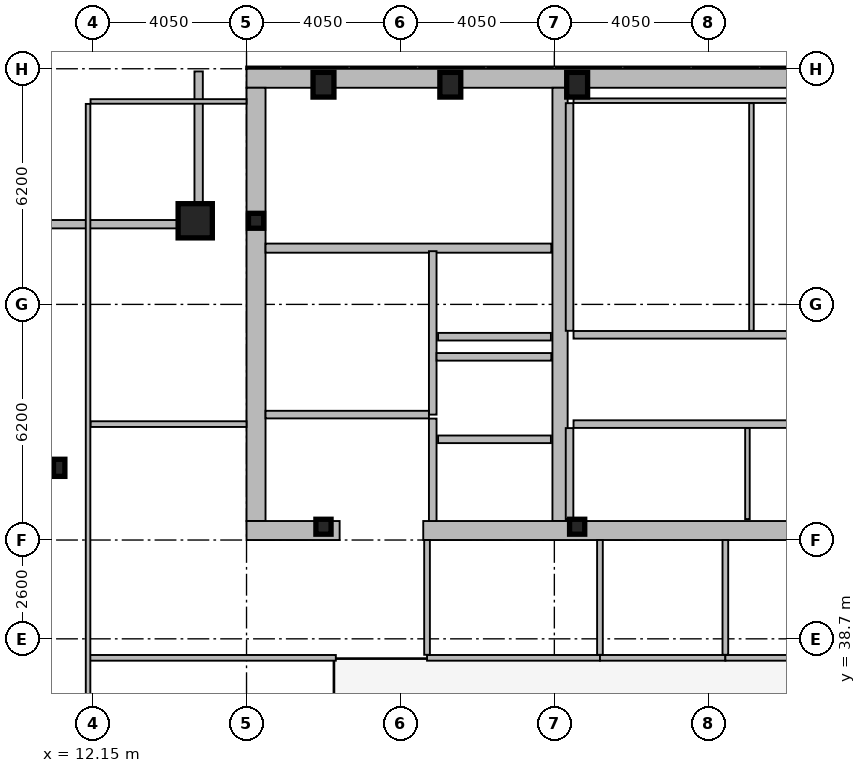
"""IFC4 building model, lengths in metres.
Left out: names, types, materials, properties, quantities, classifications, styles, units other than length and angle.
Written with IfcOpenShell. Run it as: python <this file> out.ifc"""

import sys

from ifc_helpers import new_model, si_unit, direction, frame, frame_2d, origin, origin_2d, place, context, subcontext, project, spatial, rectangle, hollow_rectangle, i_section, extrude, element, fill, save


model = new_model("IFC4")
c1 = context("Model", 3, precision=1e-05, world=origin(), true_north=direction((0.0, 1.0)))
c2 = subcontext(c1, "Body", "Model", "MODEL_VIEW")
j1 = project(units=[si_unit("LENGTHUNIT", "METRE"), si_unit("PLANEANGLEUNIT", "RADIAN")], contexts=[c1])
p1 = place(None, origin())
s1 = spatial("IfcSite", under=j1, at=p1, CompositionType="ELEMENT")
p2 = place(p1, origin())
s2 = spatial("IfcBuilding", under=s1, at=p2, CompositionType="ELEMENT")
p3 = place(p2, frame((0.0, 0.0, 329.0)))
s3 = spatial("IfcBuildingStorey", under=s2, at=p3, CompositionType="ELEMENT", Elevation=329.0)
p4 = place(p3, frame((16.2, 53.45, 0.0), z_axis=(0.0, 0.0, 1.0), x_axis=(1.0, 0.0, 0.0)))
e1 = element("IfcWall", 1, at=p4, inside=s3, PredefinedType="SHEAR", context=c2, shape_type="SweptSolid", body=[
    extrude(rectangle(XDim=40.5, YDim=0.5, at=frame_2d((20.25, 0.0))), origin(), (0.0, 0.0, 1.0), 3.44),
])
p5 = place(p3, frame((16.45, 41.8, 0.0), z_axis=(0.0, 0.0, 1.0), x_axis=(0.0, 1.0, 0.0)))
e2 = element("IfcWall", 2, at=p5, inside=s3, PredefinedType="SHEAR", context=c2, shape_type="SweptSolid", body=[
    extrude(rectangle(XDim=11.4, YDim=0.5, at=frame_2d((5.7, 0.0))), origin(), (0.0, 0.0, 1.0), 3.44),
])
p6 = place(p3, frame((24.45, 41.8, 0.0), z_axis=(0.0, 0.0, 1.0), x_axis=(0.0, 1.0, 0.0)))
e3 = element("IfcWall", 3, at=p6, inside=s3, PredefinedType="SHEAR", context=c2, shape_type="SweptSolid", body=[
    extrude(rectangle(XDim=11.4, YDim=0.4, at=frame_2d((5.7, 0.0))), origin(), (0.0, 0.0, 1.0), 3.44),
])
p7 = place(p3, frame((18.65, 41.55, 0.0), z_axis=(0.0, 0.0, 1.0), x_axis=(-1.0, 0.0, 0.0)))
e4 = element("IfcWall", 4, at=p7, inside=s3, PredefinedType="SHEAR", context=c2, shape_type="SweptSolid", body=[
    extrude(rectangle(XDim=2.45, YDim=0.5, at=frame_2d((1.225, 0.0))), origin(), (0.0, 0.0, 1.0), 3.44),
])
p8 = place(p3, frame((32.3, 41.55, 0.0), z_axis=(0.0, 0.0, 1.0), x_axis=(-1.0, 0.0, 0.0)))
e5 = element("IfcWall", 5, at=p8, inside=s3, PredefinedType="SHEAR", context=c2, shape_type="SweptSolid", body=[
    extrude(rectangle(XDim=11.45, YDim=0.5, at=frame_2d((5.725, 0.0))), origin(), (0.0, 0.0, 1.0), 3.44),
])
p9 = place(p3, frame((16.7, 48.98, 0.0), z_axis=(0.0, 0.0, 1.0), x_axis=(1.0, 0.0, 0.0)))
e6 = element("IfcWall", 6, at=p9, inside=s3, PredefinedType="SHEAR", context=c2, shape_type="SweptSolid", body=[
    extrude(rectangle(XDim=7.52, YDim=0.24, at=frame_2d((3.76, 0.0))), origin(), (0.0, 0.0, 1.0), 3.44),
])
p10 = place(p9, frame((0.22, 0.0, 0.0)))
e7 = element("IfcOpeningElement", 7, at=p10, cuts=e6, PredefinedType="OPENING", context=c2, shape_type="SweptSolid", body=[
    extrude(rectangle(XDim=1.05, YDim=2.15, at=frame_2d((0.525, 1.075))), frame((0.0, 0.13, 0.0), z_axis=(0.0, -1.0, 0.0), x_axis=(1.0, 0.0, 0.0)), (0.0, 0.0, 1.0), 0.26),
])
p11 = place(p3, frame((14.85, 49.7, 0.0), z_axis=(0.0, 0.0, 1.0), x_axis=(1.0, 0.0, 0.0)))
e8 = element("IfcColumn", 8, at=p11, inside=s3, PredefinedType="COLUMN", context=c2, shape_type="SweptSolid", body=[
    extrude(hollow_rectangle(XDim=0.9, YDim=0.9, WallThickness=0.05, at=origin_2d()), origin(), (0.0, 0.0, 1.0), 3.6),
])
for number, where, z_axis, x_axis in (
    (9, (18.225, 53.28, 0.0), (0.0, 0.0, 1.0), (1.0, 0.0, 0.0)),
    (10, (21.562, 53.28, 0.0), (0.0, 0.0, 1.0), (1.0, 0.0, 0.0)),
    (11, (24.9, 53.28, 0.0), (0.0, 0.0, 1.0), (1.0, 0.0, 0.0)),
):
    element("IfcColumn", number, at=place(p3, frame(where, z_axis=z_axis, x_axis=x_axis)), inside=s3, PredefinedType="COLUMN", context=c2, shape_type="SweptSolid", body=[
        extrude(hollow_rectangle(XDim=0.55, YDim=0.65, WallThickness=0.04, at=origin_2d()), origin(), (0.0, 0.0, 1.0), 3.6),
    ])
p12 = place(p3, frame((11.27, 43.2, 0.0), z_axis=(0.0, 0.0, 1.0), x_axis=(1.0, 0.0, 0.0)))
e12 = element("IfcColumn", 12, at=p12, inside=s3, PredefinedType="COLUMN", context=c2, shape_type="SweptSolid", body=[
    extrude(i_section(OverallWidth=0.3, OverallDepth=0.45, WebThickness=0.014, FlangeThickness=0.026, at=origin_2d()), origin(), (0.0, 0.0, 1.0), 3.6),
])
for number, where, z_axis, x_axis in (
    (13, (16.45, 49.7, 0.0), (0.0, 0.0, 1.0), (1.0, 0.0, 0.0)),
    (14, (18.225, 41.65, 0.0), (0.0, 0.0, 1.0), (1.0, 0.0, 0.0)),
    (15, (24.9, 41.65, 0.0), (0.0, 0.0, 1.0), (1.0, 0.0, 0.0)),
):
    element("IfcColumn", number, at=place(p3, frame(where, z_axis=z_axis, x_axis=x_axis)), inside=s3, PredefinedType="COLUMN", context=c2, shape_type="SweptSolid", body=[
        extrude(i_section(OverallWidth=0.399, OverallDepth=0.393, WebThickness=0.023, FlangeThickness=0.037, at=origin_2d()), origin(), (0.0, 0.0, 1.0), 3.6),
    ])
p13 = place(p3, frame((10.83, 49.61, 0.0), z_axis=(0.0, 0.0, 1.0), x_axis=(1.0, 0.0, 0.0)))
e16 = element("IfcWall", 16, at=p13, inside=s3, PredefinedType="SOLIDWALL", context=c2, shape_type="SweptSolid", body=[
    extrude(rectangle(XDim=4.22, YDim=0.22, at=frame_2d((2.11, 0.0))), origin(), (0.0, 0.0, 1.0), 2.88),
])
p14 = place(p3, frame((14.94, 49.72, 0.0), z_axis=(0.0, 0.0, 1.0), x_axis=(0.0, 1.0, 0.0)))
e17 = element("IfcWall", 17, at=p14, inside=s3, PredefinedType="SOLIDWALL", context=c2, shape_type="SweptSolid", body=[
    extrude(rectangle(XDim=3.91, YDim=0.22, at=frame_2d((1.955, 0.0))), origin(), (0.0, 0.0, 1.0), 2.88),
])
p15 = place(p3, frame((24.21, 43.95, 0.0), z_axis=(0.0, 0.0, 1.0), x_axis=(-1.0, 0.0, 0.0)))
e18 = element("IfcWall", 18, at=p15, inside=s3, PredefinedType="PARTITIONING", context=c2, shape_type="SweptSolid", body=[
    extrude(rectangle(XDim=2.97, YDim=0.2, at=frame_2d((1.485, 0.0))), origin(), (0.0, 0.0, 1.0), 3.44),
])
p16 = place(p15, frame((0.86, 0.0, 0.0)))
e19 = element("IfcOpeningElement", 19, at=p16, cuts=e18, PredefinedType="OPENING", context=c2, shape_type="SweptSolid", body=[
    extrude(rectangle(XDim=1.3, YDim=2.18, at=frame_2d((0.65, 1.09))), frame((0.0, 0.11, 0.0), z_axis=(0.0, -1.0, 0.0), x_axis=(1.0, 0.0, 0.0)), (0.0, 0.0, 1.0), 0.22),
])
p17 = place(p3, frame((24.21, 46.65, 0.0), z_axis=(0.0, 0.0, 1.0), x_axis=(-1.0, 0.0, 0.0)))
e20 = element("IfcWall", 20, at=p17, inside=s3, PredefinedType="PARTITIONING", context=c2, shape_type="SweptSolid", body=[
    extrude(rectangle(XDim=2.97, YDim=0.2, at=frame_2d((1.485, 0.0))), origin(), (0.0, 0.0, 1.0), 3.44),
])
p18 = place(p17, frame((0.91, 0.0, 0.0)))
e21 = element("IfcOpeningElement", 21, at=p18, cuts=e20, PredefinedType="OPENING", context=c2, shape_type="SweptSolid", body=[
    extrude(rectangle(XDim=1.2, YDim=2.18, at=frame_2d((0.6, 1.09))), frame((0.0, 0.11, 0.0), z_axis=(0.0, -1.0, 0.0), x_axis=(1.0, 0.0, 0.0)), (0.0, 0.0, 1.0), 0.22),
])
p19 = place(p3, frame((21.1, 44.6, 0.0), z_axis=(0.0, 0.0, 1.0), x_axis=(0.0, 1.0, 0.0)))
e22 = element("IfcWall", 22, at=p19, inside=s3, PredefinedType="PARTITIONING", context=c2, shape_type="SweptSolid", body=[
    extrude(rectangle(XDim=4.3, YDim=0.2, at=frame_2d((2.15, 0.0))), origin(), (0.0, 0.0, 1.0), 3.44),
])
p20 = place(p3, frame((16.7, 44.6, 0.0), z_axis=(0.0, 0.0, 1.0), x_axis=(1.0, 0.0, 0.0)))
e23 = element("IfcWall", 23, at=p20, inside=s3, PredefinedType="PARTITIONING", context=c2, shape_type="SweptSolid", body=[
    extrude(rectangle(XDim=4.3, YDim=0.2, at=frame_2d((2.15, 0.0))), origin(), (0.0, 0.0, 1.0), 3.44),
])
p21 = place(p20, frame((1.25, 0.0, 0.0)))
e24 = element("IfcOpeningElement", 24, at=p21, cuts=e23, PredefinedType="OPENING", context=c2, shape_type="SweptSolid", body=[
    extrude(rectangle(XDim=1.05, YDim=2.15, at=frame_2d((0.525, 1.075))), frame((0.0, 0.11, 0.0), z_axis=(0.0, -1.0, 0.0), x_axis=(1.0, 0.0, 0.0)), (0.0, 0.0, 1.0), 0.22),
])
p22 = place(p3, frame((21.2, 46.12, 0.0), z_axis=(0.0, 0.0, 1.0), x_axis=(1.0, 0.0, 0.0)))
e25 = element("IfcWall", 25, at=p22, inside=s3, PredefinedType="PARTITIONING", context=c2, shape_type="SweptSolid", body=[
    extrude(rectangle(XDim=3.02, YDim=0.2, at=frame_2d((1.51, 0.0))), origin(), (0.0, 0.0, 1.0), 3.44),
])
p23 = place(p3, frame((21.1, 41.8, 0.0), z_axis=(0.0, 0.0, 1.0), x_axis=(0.0, 1.0, 0.0)))
e26 = element("IfcWall", 26, at=p23, inside=s3, PredefinedType="PARTITIONING", context=c2, shape_type="SweptSolid", body=[
    extrude(rectangle(XDim=2.695, YDim=0.2, at=frame_2d((1.348, 0.0))), origin(), (0.0, 0.0, 1.0), 3.44),
])
p24 = place(p23, frame((0.38, 0.0, 0.0)))
e27 = element("IfcOpeningElement", 27, at=p24, cuts=e26, PredefinedType="OPENING", context=c2, shape_type="SweptSolid", body=[
    extrude(rectangle(XDim=1.05, YDim=2.15, at=frame_2d((0.525, 1.075))), frame((0.0, 0.11, 0.0), z_axis=(0.0, -1.0, 0.0), x_axis=(1.0, 0.0, 0.0)), (0.0, 0.0, 1.0), 0.22),
])
p25 = place(p3, frame((24.7, 46.805, 0.0), z_axis=(0.0, 0.0, 1.0), x_axis=(0.0, 1.0, 0.0)))
e28 = element("IfcWall", 28, at=p25, inside=s3, PredefinedType="PARTITIONING", context=c2, shape_type="SweptSolid", body=[
    extrude(rectangle(XDim=5.99, YDim=0.2, at=frame_2d((2.995, 0.0))), origin(), (0.0, 0.0, 1.0), 3.44),
])
p26 = place(p3, frame((24.805, 52.86, 0.0), z_axis=(0.0, 0.0, 1.0), x_axis=(1.0, 0.0, 0.0)))
e29 = element("IfcWall", 29, at=p26, inside=s3, PredefinedType="PARTITIONING", context=c2, shape_type="SweptSolid", body=[
    extrude(rectangle(XDim=7.51, YDim=0.12, at=frame_2d((3.755, 0.0))), origin(), (0.0, 0.0, 1.0), 3.44),
])
p27 = place(p3, frame((29.486, 46.805, 0.0), z_axis=(0.0, 0.0, 1.0), x_axis=(0.0, 1.0, 0.0)))
e30 = element("IfcWall", 30, at=p27, inside=s3, PredefinedType="PARTITIONING", context=c2, shape_type="SweptSolid", body=[
    extrude(rectangle(XDim=5.99, YDim=0.12, at=frame_2d((2.995, 0.0))), origin(), (0.0, 0.0, 1.0), 3.44),
])
p28 = place(p3, frame((24.805, 46.7, 0.0), z_axis=(0.0, 0.0, 1.0), x_axis=(1.0, 0.0, 0.0)))
e31 = element("IfcWall", 31, at=p28, inside=s3, PredefinedType="PARTITIONING", context=c2, shape_type="SweptSolid", body=[
    extrude(rectangle(XDim=7.51, YDim=0.2, at=frame_2d((3.755, 0.0))), origin(), (0.0, 0.0, 1.0), 3.44),
])
p29 = place(p28, frame((1.15, 0.0, 0.0)))
e32 = element("IfcOpeningElement", 32, at=p29, cuts=e31, PredefinedType="OPENING", context=c2, shape_type="SweptSolid", body=[
    extrude(rectangle(XDim=0.95, YDim=2.1, at=frame_2d((0.475, 1.05))), frame((0.0, 0.11, 0.0), z_axis=(0.0, -1.0, 0.0), x_axis=(1.0, 0.0, 0.0)), (0.0, 0.0, 1.0), 0.22),
])
p30 = place(p28, frame((5.336, 0.0, 0.0)))
e33 = element("IfcOpeningElement", 33, at=p30, cuts=e31, PredefinedType="OPENING", context=c2, shape_type="SweptSolid", body=[
    extrude(rectangle(XDim=0.95, YDim=2.1, at=frame_2d((0.475, 1.05))), frame((0.0, 0.11, 0.0), z_axis=(0.0, -1.0, 0.0), x_axis=(1.0, 0.0, 0.0)), (0.0, 0.0, 1.0), 0.22),
])
p31 = place(p3, frame((24.7, 41.85, 0.0), z_axis=(0.0, 0.0, 1.0), x_axis=(0.0, 1.0, 0.0)))
e34 = element("IfcWall", 34, at=p31, inside=s3, PredefinedType="PARTITIONING", context=c2, shape_type="SweptSolid", body=[
    extrude(rectangle(XDim=2.395, YDim=0.2, at=frame_2d((1.198, 0.0))), origin(), (0.0, 0.0, 1.0), 3.44),
])
p32 = place(p3, frame((29.381, 41.85, 0.0), z_axis=(0.0, 0.0, 1.0), x_axis=(0.0, 1.0, 0.0)))
e35 = element("IfcWall", 35, at=p32, inside=s3, PredefinedType="PARTITIONING", context=c2, shape_type="SweptSolid", body=[
    extrude(rectangle(XDim=2.395, YDim=0.12, at=frame_2d((1.198, 0.0))), origin(), (0.0, 0.0, 1.0), 3.44),
])
p33 = place(p3, frame((24.805, 44.35, 0.0), z_axis=(0.0, 0.0, 1.0), x_axis=(1.0, 0.0, 0.0)))
e36 = element("IfcWall", 36, at=p33, inside=s3, PredefinedType="PARTITIONING", context=c2, shape_type="SweptSolid", body=[
    extrude(rectangle(XDim=7.34, YDim=0.2, at=frame_2d((3.67, 0.0))), origin(), (0.0, 0.0, 1.0), 3.44),
])
p34 = place(p33, frame((1.15, 0.0, 0.0)))
e37 = element("IfcOpeningElement", 37, at=p34, cuts=e36, PredefinedType="OPENING", context=c2, shape_type="SweptSolid", body=[
    extrude(rectangle(XDim=0.95, YDim=2.1, at=frame_2d((0.475, 1.05))), frame((0.0, 0.11, 0.0), z_axis=(0.0, -1.0, 0.0), x_axis=(1.0, 0.0, 0.0)), (0.0, 0.0, 1.0), 0.22),
])
p35 = place(p33, frame((5.231, 0.0, 0.0)))
e38 = element("IfcOpeningElement", 38, at=p35, cuts=e36, PredefinedType="OPENING", context=c2, shape_type="SweptSolid", body=[
    extrude(rectangle(XDim=0.95, YDim=2.1, at=frame_2d((0.475, 1.05))), frame((0.0, 0.11, 0.0), z_axis=(0.0, -1.0, 0.0), x_axis=(1.0, 0.0, 0.0)), (0.0, 0.0, 1.0), 0.22),
])
p36 = place(p3, frame((20.95, 38.2, 0.0), z_axis=(0.0, 0.0, 1.0), x_axis=(1.0, 0.0, 0.0)))
e39 = element("IfcWall", 39, at=p36, inside=s3, PredefinedType="PARTITIONING", context=c2, shape_type="SweptSolid", body=[
    extrude(rectangle(XDim=4.55, YDim=0.15, at=frame_2d((2.275, 0.0))), origin(), (0.0, 0.0, 1.0), 2.83),
])
p37 = place(p36, frame((0.9, 0.0, 0.0)))
e40 = element("IfcOpeningElement", 40, at=p37, cuts=e39, PredefinedType="OPENING", context=c2, shape_type="SweptSolid", body=[
    extrude(rectangle(XDim=0.95, YDim=2.05, at=frame_2d((0.475, 1.025))), frame((0.0, 0.085, 0.0), z_axis=(0.0, -1.0, 0.0), x_axis=(1.0, 0.0, 0.0)), (0.0, 0.0, 1.0), 0.17),
])
p38 = place(p3, frame((25.5, 38.2, 0.0), z_axis=(0.0, 0.0, 1.0), x_axis=(1.0, 0.0, 0.0)))
e41 = element("IfcWall", 41, at=p38, inside=s3, PredefinedType="PARTITIONING", context=c2, shape_type="SweptSolid", body=[
    extrude(rectangle(XDim=3.3, YDim=0.15, at=frame_2d((1.65, 0.0))), origin(), (0.0, 0.0, 1.0), 3.44),
])
p39 = place(p38, frame((0.9, 0.0, 0.0)))
e42 = element("IfcOpeningElement", 42, at=p39, cuts=e41, PredefinedType="OPENING", context=c2, shape_type="SweptSolid", body=[
    extrude(rectangle(XDim=0.95, YDim=2.05, at=frame_2d((0.475, 1.025))), frame((0.0, 0.085, 0.0), z_axis=(0.0, -1.0, 0.0), x_axis=(1.0, 0.0, 0.0)), (0.0, 0.0, 1.0), 0.17),
])
p40 = place(p3, frame((28.8, 38.2, 0.0), z_axis=(0.0, 0.0, 1.0), x_axis=(1.0, 0.0, 0.0)))
e43 = element("IfcWall", 43, at=p40, inside=s3, PredefinedType="PARTITIONING", context=c2, shape_type="SweptSolid", body=[
    extrude(rectangle(XDim=3.38, YDim=0.15, at=frame_2d((1.69, 0.0))), origin(), (0.0, 0.0, 1.0), 3.44),
])
p41 = place(p40, frame((0.7, 0.0, 0.0)))
e44 = element("IfcOpeningElement", 44, at=p41, cuts=e43, PredefinedType="OPENING", context=c2, shape_type="SweptSolid", body=[
    extrude(rectangle(XDim=0.95, YDim=2.05, at=frame_2d((0.475, 1.025))), frame((0.0, 0.085, 0.0), z_axis=(0.0, -1.0, 0.0), x_axis=(1.0, 0.0, 0.0)), (0.0, 0.0, 1.0), 0.17),
])
for number, where, z_axis, x_axis in (
    (45, (20.95, 38.28, 0.0), (0.0, 0.0, 1.0), (0.0, 1.0, 0.0)),
    (46, (25.5, 38.28, 0.0), (0.0, 0.0, 1.0), (0.0, 1.0, 0.0)),
    (47, (28.8, 38.28, 0.0), (0.0, 0.0, 1.0), (0.0, 1.0, 0.0)),
):
    element("IfcWall", number, at=place(p3, frame(where, z_axis=z_axis, x_axis=x_axis)), inside=s3, PredefinedType="PARTITIONING", context=c2, shape_type="SweptSolid", body=[
        extrude(rectangle(XDim=3.02, YDim=0.15, at=frame_2d((1.51, 0.0))), origin(), (0.0, 0.0, 1.0), 3.44),
    ])
p42 = place(p3, frame((12.03, 38.2, 0.0), z_axis=(0.0, 0.0, 1.0), x_axis=(1.0, 0.0, 0.0)))
e48 = element("IfcWall", 48, at=p42, inside=s3, PredefinedType="PARTITIONING", context=c2, shape_type="SweptSolid", body=[
    extrude(rectangle(XDim=6.52, YDim=0.15, at=frame_2d((3.26, 0.0))), origin(), (0.0, 0.0, 1.0), 2.83),
])
p43 = place(p42, frame((2.32, 0.0, 0.0)))
e49 = element("IfcOpeningElement", 49, at=p43, cuts=e48, PredefinedType="OPENING", context=c2, shape_type="SweptSolid", body=[
    extrude(rectangle(XDim=0.95, YDim=2.05, at=frame_2d((0.475, 1.025))), frame((0.0, 0.085, 0.0), z_axis=(0.0, -1.0, 0.0), x_axis=(1.0, 0.0, 0.0)), (0.0, 0.0, 1.0), 0.17),
])
p44 = place(p3, frame((12.095, 44.35, 0.0), z_axis=(0.0, 0.0, 1.0), x_axis=(1.0, 0.0, 0.0)))
e50 = element("IfcWall", 50, at=p44, inside=s3, PredefinedType="PARTITIONING", context=c2, shape_type="SweptSolid", body=[
    extrude(rectangle(XDim=4.105, YDim=0.15, at=frame_2d((2.052, 0.0))), origin(), (0.0, 0.0, 1.0), 2.88),
])
p45 = place(p44, frame((2.32, 0.0, 0.0)))
e51 = element("IfcOpeningElement", 51, at=p45, cuts=e50, PredefinedType="OPENING", context=c2, shape_type="SweptSolid", body=[
    extrude(rectangle(XDim=0.9, YDim=2.05, at=frame_2d((0.45, 1.025))), frame((0.0, 0.085, 0.0), z_axis=(0.0, -1.0, 0.0), x_axis=(1.0, 0.0, 0.0)), (0.0, 0.0, 1.0), 0.17),
])
p46 = place(p3, frame((12.03, 10.665, 0.0), z_axis=(0.0, 0.0, 1.0), x_axis=(0.0, 1.0, 0.0)))
e52 = element("IfcWall", 52, at=p46, inside=s3, PredefinedType="PARTITIONING", context=c2, shape_type="SweptSolid", body=[
    extrude(rectangle(XDim=42.11, YDim=0.12, at=frame_2d((21.055, 0.0))), origin(), (0.0, 0.0, 1.0), 2.83),
])
p47 = place(p3, frame((12.095, 52.84, 0.0), z_axis=(0.0, 0.0, 1.0), x_axis=(1.0, 0.0, 0.0)))
e53 = element("IfcWall", 53, at=p47, inside=s3, PredefinedType="PARTITIONING", context=c2, shape_type="SweptSolid", body=[
    extrude(rectangle(XDim=4.105, YDim=0.12, at=frame_2d((2.052, 0.0))), origin(), (0.0, 0.0, 1.0), 3.44),
])
p48 = place(p10, origin())
e54 = element("IfcDoor", 54, at=p48, inside=s3, OperationType="SINGLE_SWING_LEFT", PredefinedType="DOOR", context=c2, shape_type="SweptSolid", body=[
    extrude(rectangle(XDim=1.05, YDim=2.15, at=frame_2d((0.525, 1.075))), frame((0.0, 0.025, 0.0), z_axis=(0.0, -1.0, 0.0), x_axis=(1.0, 0.0, 0.0)), (0.0, 0.0, 1.0), 0.05),
])
fill(e7, e54)
p49 = place(p16, origin())
e55 = element("IfcDoor", 55, at=p49, inside=s3, OperationType="SLIDING_TO_LEFT", PredefinedType="DOOR", context=c2, shape_type="SweptSolid", body=[
    extrude(rectangle(XDim=1.3, YDim=2.18, at=frame_2d((0.65, 1.09))), frame((0.0, 0.025, 0.0), z_axis=(0.0, -1.0, 0.0), x_axis=(1.0, 0.0, 0.0)), (0.0, 0.0, 1.0), 0.05),
])
fill(e19, e55)
p50 = place(p18, origin())
e56 = element("IfcDoor", 56, at=p50, inside=s3, OperationType="SLIDING_TO_LEFT", PredefinedType="DOOR", context=c2, shape_type="SweptSolid", body=[
    extrude(rectangle(XDim=1.2, YDim=2.18, at=frame_2d((0.6, 1.09))), frame((0.0, 0.025, 0.0), z_axis=(0.0, -1.0, 0.0), x_axis=(1.0, 0.0, 0.0)), (0.0, 0.0, 1.0), 0.05),
])
fill(e21, e56)
p51 = place(p21, origin())
e57 = element("IfcDoor", 57, at=p51, inside=s3, OperationType="SINGLE_SWING_RIGHT", PredefinedType="DOOR", context=c2, shape_type="SweptSolid", body=[
    extrude(rectangle(XDim=1.05, YDim=2.15, at=frame_2d((0.525, 1.075))), frame((0.0, 0.025, 0.0), z_axis=(0.0, -1.0, 0.0), x_axis=(1.0, 0.0, 0.0)), (0.0, 0.0, 1.0), 0.05),
])
fill(e24, e57)
p52 = place(p24, origin())
e58 = element("IfcDoor", 58, at=p52, inside=s3, OperationType="SINGLE_SWING_LEFT", PredefinedType="DOOR", context=c2, shape_type="SweptSolid", body=[
    extrude(rectangle(XDim=1.05, YDim=2.15, at=frame_2d((0.525, 1.075))), frame((0.0, 0.025, 0.0), z_axis=(0.0, -1.0, 0.0), x_axis=(1.0, 0.0, 0.0)), (0.0, 0.0, 1.0), 0.05),
])
fill(e27, e58)
p53 = place(p29, origin())
e59 = element("IfcDoor", 59, at=p53, inside=s3, OperationType="SINGLE_SWING_RIGHT", PredefinedType="DOOR", context=c2, shape_type="SweptSolid", body=[
    extrude(rectangle(XDim=0.95, YDim=2.1, at=frame_2d((0.475, 1.05))), frame((0.0, 0.025, 0.0), z_axis=(0.0, -1.0, 0.0), x_axis=(1.0, 0.0, 0.0)), (0.0, 0.0, 1.0), 0.05),
])
fill(e32, e59)
p54 = place(p30, origin())
e60 = element("IfcDoor", 60, at=p54, inside=s3, OperationType="SINGLE_SWING_LEFT", PredefinedType="DOOR", context=c2, shape_type="SweptSolid", body=[
    extrude(rectangle(XDim=0.95, YDim=2.1, at=frame_2d((0.475, 1.05))), frame((0.0, 0.025, 0.0), z_axis=(0.0, -1.0, 0.0), x_axis=(1.0, 0.0, 0.0)), (0.0, 0.0, 1.0), 0.05),
])
fill(e33, e60)
p55 = place(p34, origin())
e61 = element("IfcDoor", 61, at=p55, inside=s3, OperationType="SINGLE_SWING_RIGHT", PredefinedType="DOOR", context=c2, shape_type="SweptSolid", body=[
    extrude(rectangle(XDim=0.95, YDim=2.1, at=frame_2d((0.475, 1.05))), frame((0.0, 0.025, 0.0), z_axis=(0.0, -1.0, 0.0), x_axis=(1.0, 0.0, 0.0)), (0.0, 0.0, 1.0), 0.05),
])
fill(e37, e61)
p56 = place(p35, origin())
e62 = element("IfcDoor", 62, at=p56, inside=s3, OperationType="SINGLE_SWING_LEFT", PredefinedType="DOOR", context=c2, shape_type="SweptSolid", body=[
    extrude(rectangle(XDim=0.95, YDim=2.1, at=frame_2d((0.475, 1.05))), frame((0.0, 0.025, 0.0), z_axis=(0.0, -1.0, 0.0), x_axis=(1.0, 0.0, 0.0)), (0.0, 0.0, 1.0), 0.05),
])
fill(e38, e62)
p57 = place(p37, origin())
e63 = element("IfcDoor", 63, at=p57, inside=s3, OperationType="SINGLE_SWING_RIGHT", PredefinedType="DOOR", context=c2, shape_type="SweptSolid", body=[
    extrude(rectangle(XDim=0.95, YDim=2.05, at=frame_2d((0.475, 1.025))), frame((0.0, 0.025, 0.0), z_axis=(0.0, -1.0, 0.0), x_axis=(1.0, 0.0, 0.0)), (0.0, 0.0, 1.0), 0.05),
])
fill(e40, e63)
p58 = place(p39, origin())
e64 = element("IfcDoor", 64, at=p58, inside=s3, OperationType="SINGLE_SWING_LEFT", PredefinedType="DOOR", context=c2, shape_type="SweptSolid", body=[
    extrude(rectangle(XDim=0.95, YDim=2.05, at=frame_2d((0.475, 1.025))), frame((0.0, 0.025, 0.0), z_axis=(0.0, -1.0, 0.0), x_axis=(1.0, 0.0, 0.0)), (0.0, 0.0, 1.0), 0.05),
])
fill(e42, e64)
p59 = place(p41, origin())
e65 = element("IfcDoor", 65, at=p59, inside=s3, OperationType="SINGLE_SWING_RIGHT", PredefinedType="DOOR", context=c2, shape_type="SweptSolid", body=[
    extrude(rectangle(XDim=0.95, YDim=2.05, at=frame_2d((0.475, 1.025))), frame((0.0, 0.025, 0.0), z_axis=(0.0, -1.0, 0.0), x_axis=(1.0, 0.0, 0.0)), (0.0, 0.0, 1.0), 0.05),
])
fill(e44, e65)
p60 = place(p43, origin())
e66 = element("IfcDoor", 66, at=p60, inside=s3, OperationType="SINGLE_SWING_LEFT", PredefinedType="DOOR", context=c2, shape_type="SweptSolid", body=[
    extrude(rectangle(XDim=0.95, YDim=2.05, at=frame_2d((0.475, 1.025))), frame((0.0, 0.025, 0.0), z_axis=(0.0, -1.0, 0.0), x_axis=(1.0, 0.0, 0.0)), (0.0, 0.0, 1.0), 0.05),
])
fill(e49, e66)
p61 = place(p45, origin())
e67 = element("IfcDoor", 67, at=p61, inside=s3, OperationType="SINGLE_SWING_LEFT", PredefinedType="DOOR", context=c2, shape_type="SweptSolid", body=[
    extrude(rectangle(XDim=0.9, YDim=2.05, at=frame_2d((0.45, 1.025))), frame((0.0, 0.025, 0.0), z_axis=(0.0, -1.0, 0.0), x_axis=(1.0, 0.0, 0.0)), (0.0, 0.0, 1.0), 0.05),
])
fill(e51, e67)
save(model, sys.argv[1])
